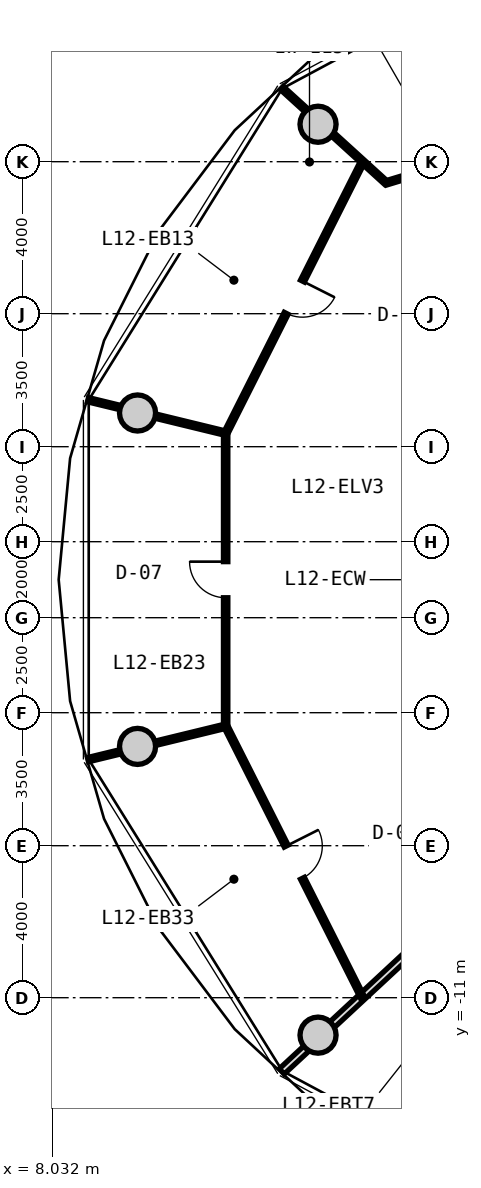
"""IFC4 building model, lengths in metres.
Left out: names, types, materials, properties, quantities, classifications, styles, units other than length and angle.
Written with IfcOpenShell. Run it as: python <this file> out.ifc"""

import sys

from ifc_helpers import new_model, si_unit, direction, frame, frame_2d, origin, origin_2d, place, context, subcontext, project, spatial, rectangle, circle, extrude, source, transform, mapped, element, fill, save


model = new_model("IFC4")
c1 = context("Model", 3, precision=1e-05, world=origin(), true_north=direction((0.0, 1.0)))
c2 = subcontext(c1, "Body", "Model", "MODEL_VIEW")
j1 = project(units=[si_unit("LENGTHUNIT", "METRE"), si_unit("PLANEANGLEUNIT", "RADIAN")], contexts=[c1])
p1 = place(None, origin())
s1 = spatial("IfcSite", under=j1, at=p1, CompositionType="ELEMENT")
p2 = place(p1, origin())
s2 = spatial("IfcBuilding", under=s1, at=p2, CompositionType="ELEMENT")
p3 = place(p2, frame((0.0, 0.0, 42.95)))
s3 = spatial("IfcBuildingStorey", under=s2, at=p3, CompositionType="ELEMENT", Elevation=42.95)
m1 = source(origin(), c2, "Body", "SweptSolid", [
    extrude(circle(Radius=0.475, at=origin_2d()), origin(), (0.0, 0.0, 1.0), 3.05),
])
for number, where, z_axis, x_axis in (
    (1, (15.025, 11.985, 0.0), (0.0, 0.0, 1.0), (1.0, 0.0, 0.0)),
    (2, (10.275, 4.387, 0.0), (0.0, 0.0, 1.0), (1.0, 0.0, 0.0)),
    (3, (10.275, -4.387, 0.0), (0.0, 0.0, 1.0), (1.0, 0.0, 0.0)),
    (4, (15.025, -11.985, 0.0), (0.0, 0.0, 1.0), (1.0, 0.0, 0.0)),
):
    element("IfcColumn", number, at=place(p3, frame(where, z_axis=z_axis, x_axis=x_axis)), inside=s3, PredefinedType="COLUMN", context=c2, shape_type="MappedRepresentation", body=[
        mapped(m1, transform((0.0, 0.0, 0.0), x_axis=(1.0, 0.0, 0.0), y_axis=(0.0, 1.0, 0.0), z_axis=(0.0, 0.0, 1.0), scale=1.0)),
    ])
m2 = source(origin(), c2, "Body", "SweptSolid", [
    extrude(rectangle(XDim=7.435, YDim=0.19, at=frame_2d((3.717, 0.0))), origin(), (0.0, 0.0, 1.0), 2.225),
])
p4 = place(p3, frame((19.517, -7.88, 0.0), z_axis=(0.0, 0.0, 1.0), x_axis=(-0.732651956848, -0.680603489652, 0.0)))
e5 = element("IfcWall", 5, at=p4, inside=s3, PredefinedType="PARTITIONING", context=c2, shape_type="MappedRepresentation", body=[
    mapped(m2, transform((0.0, 0.0, 0.0), x_axis=(1.0, 0.0, 0.0), y_axis=(0.0, 1.0, 0.0), z_axis=(0.0, 0.0, 1.0), scale=1.0)),
])
m3 = source(origin(), c2, "Body", "SweptSolid", [
    extrude(rectangle(XDim=8.018, YDim=0.115, at=frame_2d((4.009, 0.0))), origin(), (0.0, 0.0, 1.0), 2.775),
])
p5 = place(p3, frame((16.205, 11.014, 0.0), z_axis=(0.0, 0.0, 1.0), x_axis=(-0.450134355233, -0.89296084026, 0.0)))
e6 = element("IfcWall", 6, at=p5, inside=s3, PredefinedType="PARTITIONING", context=c2, shape_type="MappedRepresentation", body=[
    mapped(m3, transform((0.0, 0.0, 0.0), x_axis=(1.0, 0.0, 0.0), y_axis=(0.0, 1.0, 0.0), z_axis=(0.0, 0.0, 1.0), scale=1.0)),
])
p6 = place(p5, frame((3.534, 0.0, 0.0)))
e7 = element("IfcOpeningElement", 7, at=p6, cuts=e6, PredefinedType="OPENING", context=c2, shape_type="SweptSolid", body=[
    extrude(rectangle(XDim=0.95, YDim=2.1, at=frame_2d((0.475, 1.05))), frame((0.0, 0.067, 0.0), z_axis=(0.0, -1.0, 0.0), x_axis=(1.0, 0.0, 0.0)), (0.0, 0.0, 1.0), 0.135),
])
m4 = source(origin(), c2, "Body", "SweptSolid", [
    extrude(rectangle(XDim=3.7, YDim=0.115, at=frame_2d((1.85, 0.0))), origin(), (0.0, 0.0, 1.0), 2.225),
])
p7 = place(p3, frame((16.808, 10.451, 0.0), z_axis=(0.0, 0.0, 1.0), x_axis=(-0.739922161065, 0.672692497033, 0.0)))
e8 = element("IfcWall", 8, at=p7, inside=s3, PredefinedType="PARTITIONING", context=c2, shape_type="MappedRepresentation", body=[
    mapped(m4, transform((0.0, 0.0, 0.0), x_axis=(1.0, 0.0, 0.0), y_axis=(0.0, 1.0, 0.0), z_axis=(0.0, 0.0, 1.0), scale=1.0)),
])
m5 = source(origin(), c2, "Body", "SweptSolid", [
    extrude(rectangle(XDim=7.709, YDim=0.115, at=frame_2d((3.855, 0.0))), origin(), (0.0, 0.0, 1.0), 2.775),
])
p8 = place(p3, frame((12.594, 3.855, 0.0), z_axis=(0.0, 0.0, 1.0), x_axis=(0.0, -1.0, 0.0)))
e9 = element("IfcWall", 9, at=p8, inside=s3, PredefinedType="PARTITIONING", context=c2, shape_type="MappedRepresentation", body=[
    mapped(m5, transform((0.0, 0.0, 0.0), x_axis=(1.0, 0.0, 0.0), y_axis=(0.0, 1.0, 0.0), z_axis=(0.0, 0.0, 1.0), scale=1.0)),
])
p9 = place(p8, frame((3.38, 0.0, 0.0)))
e10 = element("IfcOpeningElement", 10, at=p9, cuts=e9, PredefinedType="OPENING", context=c2, shape_type="SweptSolid", body=[
    extrude(rectangle(XDim=0.95, YDim=2.1, at=frame_2d((0.475, 1.05))), frame((0.0, 0.067, 0.0), z_axis=(0.0, -1.0, 0.0), x_axis=(1.0, 0.0, 0.0)), (0.0, 0.0, 1.0), 0.135),
])
m6 = source(origin(), c2, "Body", "SweptSolid", [
    extrude(rectangle(XDim=3.728, YDim=0.115, at=frame_2d((1.864, 0.0))), origin(), (0.0, 0.0, 1.0), 2.225),
])
p10 = place(p3, frame((12.594, 3.855, 0.0), z_axis=(0.0, 0.0, 1.0), x_axis=(-0.971641177968, 0.236460189624, 0.0)))
e11 = element("IfcWall", 11, at=p10, inside=s3, PredefinedType="PARTITIONING", context=c2, shape_type="MappedRepresentation", body=[
    mapped(m6, transform((0.0, 0.0, 0.0), x_axis=(1.0, 0.0, 0.0), y_axis=(0.0, 1.0, 0.0), z_axis=(0.0, 0.0, 1.0), scale=1.0)),
])
p11 = place(p3, frame((12.596, -3.854, 0.0), z_axis=(0.0, 0.0, 1.0), x_axis=(0.450134355233, -0.89296084026, 0.0)))
e12 = element("IfcWall", 12, at=p11, inside=s3, PredefinedType="PARTITIONING", context=c2, shape_type="MappedRepresentation", body=[
    mapped(m3, transform((0.0, 0.0, 0.0), x_axis=(1.0, 0.0, 0.0), y_axis=(0.0, 1.0, 0.0), z_axis=(0.0, 0.0, 1.0), scale=1.0)),
])
p12 = place(p11, frame((3.534, 0.0, 0.0)))
e13 = element("IfcOpeningElement", 13, at=p12, cuts=e12, PredefinedType="OPENING", context=c2, shape_type="SweptSolid", body=[
    extrude(rectangle(XDim=0.95, YDim=2.1, at=frame_2d((0.475, 1.05))), frame((0.0, 0.067, 0.0), z_axis=(0.0, -1.0, 0.0), x_axis=(1.0, 0.0, 0.0)), (0.0, 0.0, 1.0), 0.135),
])
m7 = source(origin(), c2, "Body", "SweptSolid", [
    extrude(rectangle(XDim=3.73, YDim=0.115, at=frame_2d((1.865, 0.0))), origin(), (0.0, 0.0, 1.0), 2.225),
])
p13 = place(p3, frame((12.596, -3.854, 0.0), z_axis=(0.0, 0.0, 1.0), x_axis=(-0.971644038568, -0.236448434791, 0.0)))
e14 = element("IfcWall", 14, at=p13, inside=s3, PredefinedType="PARTITIONING", context=c2, shape_type="MappedRepresentation", body=[
    mapped(m7, transform((0.0, 0.0, 0.0), x_axis=(1.0, 0.0, 0.0), y_axis=(0.0, 1.0, 0.0), z_axis=(0.0, 0.0, 1.0), scale=1.0)),
])
m8 = source(origin(), c2, "Body", "SweptSolid", [
    extrude(rectangle(XDim=4.159, YDim=0.115, at=frame_2d((2.079, 0.0))), origin(), (0.0, 0.0, 1.0), 2.415),
])
p14 = place(p3, frame((20.796, 11.651, 0.0), z_axis=(0.0, 0.0, 1.0), x_axis=(-0.956846477815, -0.290593905466, 0.0)))
e15 = element("IfcWall", 15, at=p14, inside=s3, PredefinedType="PARTITIONING", context=c2, shape_type="MappedRepresentation", body=[
    mapped(m8, transform((0.0, 0.0, 0.0), x_axis=(1.0, 0.0, 0.0), y_axis=(0.0, 1.0, 0.0), z_axis=(0.0, 0.0, 1.0), scale=1.0)),
])
m9 = source(origin(), c2, "Body", "SweptSolid", [
    extrude(rectangle(XDim=0.95, YDim=2.1, at=frame_2d((0.475, 1.05))), frame((0.0, 0.025, 0.0), z_axis=(0.0, -1.0, 0.0), x_axis=(1.0, 0.0, 0.0)), (0.0, 0.0, 1.0), 0.05),
])
p15 = place(p6, origin())
e16 = element("IfcDoor", 16, at=p15, inside=s3, OperationType="SINGLE_SWING_LEFT", PredefinedType="DOOR", context=c2, shape_type="MappedRepresentation", body=[
    mapped(m9, transform((0.0, 0.0, 0.0), x_axis=(1.0, 0.0, 0.0), y_axis=(0.0, 1.0, 0.0), z_axis=(0.0, 0.0, 1.0), scale=1.0)),
])
fill(e7, e16)
p16 = place(p9, frame((0.95, 0.0, 0.0), z_axis=(0.0, 0.0, 1.0), x_axis=(-1.0, 0.0, 0.0)))
e17 = element("IfcDoor", 17, at=p16, inside=s3, OperationType="SINGLE_SWING_RIGHT", PredefinedType="DOOR", context=c2, shape_type="MappedRepresentation", body=[
    mapped(m9, transform((0.0, 0.0, 0.0), x_axis=(1.0, 0.0, 0.0), y_axis=(0.0, 1.0, 0.0), z_axis=(0.0, 0.0, 1.0), scale=1.0)),
])
fill(e10, e17)
p17 = place(p12, origin())
e18 = element("IfcDoor", 18, at=p17, inside=s3, OperationType="SINGLE_SWING_LEFT", PredefinedType="DOOR", context=c2, shape_type="MappedRepresentation", body=[
    mapped(m9, transform((0.0, 0.0, 0.0), x_axis=(1.0, 0.0, 0.0), y_axis=(0.0, 1.0, 0.0), z_axis=(0.0, 0.0, 1.0), scale=1.0)),
])
fill(e13, e18)
save(model, sys.argv[1])
